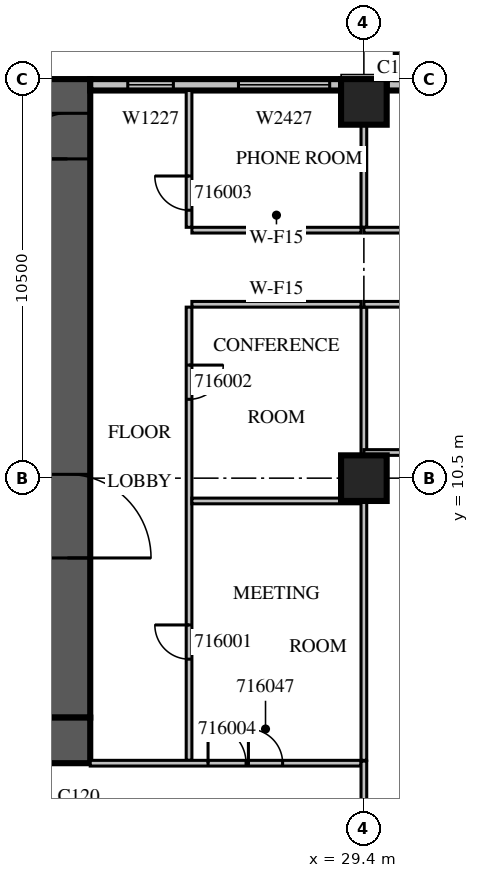
"""IFC4 building model, lengths in metres.
Left out: names, types, materials, properties, quantities, classifications, styles, units other than length and angle.
Written with IfcOpenShell. Run it as: python <this file> out.ifc"""

import sys

from ifc_helpers import new_model, si_unit, direction, frame, frame_2d, origin, origin_2d, place, context, subcontext, project, spatial, rectangle, extrude, source, transform, mapped, element, fill, save


model = new_model("IFC4")
c1 = context("Model", 3, precision=1e-05, world=origin(), true_north=direction((0.0, 1.0)))
c2 = subcontext(c1, "Body", "Model", "MODEL_VIEW")
j1 = project(units=[si_unit("LENGTHUNIT", "METRE"), si_unit("PLANEANGLEUNIT", "RADIAN")], contexts=[c1])
p1 = place(None, origin())
s1 = spatial("IfcSite", under=j1, at=p1, CompositionType="ELEMENT")
p2 = place(p1, origin())
s2 = spatial("IfcBuilding", under=s1, at=p2, CompositionType="ELEMENT")
p3 = place(p2, frame((0.0, 0.0, 78.3)))
s3 = spatial("IfcBuildingStorey", under=s2, at=p3, CompositionType="ELEMENT", Elevation=78.3)
m1 = source(origin(), c2, "Body", "SweptSolid", [
    extrude(rectangle(XDim=1.2, YDim=1.2, at=origin_2d()), origin(), (0.0, 0.0, 1.0), 4.2),
])
for number, where, z_axis, x_axis in (
    (1, (29.4, 10.5, 0.0), (0.0, 0.0, 1.0), (1.0, 0.0, 0.0)),
    (2, (29.4, 20.4, 0.0), (0.0, 0.0, 1.0), (1.0, 0.0, 0.0)),
):
    element("IfcColumn", number, at=place(p3, frame(where, z_axis=z_axis, x_axis=x_axis)), inside=s3, PredefinedType="COLUMN", context=c2, shape_type="MappedRepresentation", body=[
        mapped(m1, transform((0.0, 0.0, 0.0), scale=1.0)),
    ])
m2 = source(origin(), c2, "Body", "SweptSolid", [
    extrude(rectangle(XDim=16.8, YDim=1.2, at=frame_2d((8.4, 0.0))), origin(), (0.0, 0.0, 1.0), 4.2),
])
p4 = place(p3, frame((21.6, 4.2, 0.0), z_axis=(0.0, 0.0, 1.0), x_axis=(0.0, 1.0, 0.0)))
e3 = element("IfcWall", 3, at=p4, inside=s3, PredefinedType="SHEAR", context=c2, shape_type="MappedRepresentation", body=[
    mapped(m2, transform((0.0, 0.0, 0.0), scale=1.0)),
])
m3 = source(origin(), c2, "Body", "SweptSolid", [
    extrude(rectangle(XDim=2.2, YDim=2.1, at=frame_2d((1.1, 1.05))), frame((0.0, 0.61, 0.0), z_axis=(0.0, -1.0, 0.0), x_axis=(1.0, 0.0, 0.0)), (0.0, 0.0, 1.0), 1.22),
])
p5 = place(p4, frame((4.2, 0.0, 0.0)))
e4 = element("IfcOpeningElement", 4, at=p5, cuts=e3, PredefinedType="OPENING", context=c2, shape_type="MappedRepresentation", body=[
    mapped(m3, transform((0.0, 0.0, 0.0), scale=1.0)),
])
m4 = source(origin(), c2, "Body", "SweptSolid", [
    extrude(rectangle(XDim=1.2, YDim=2.1, at=frame_2d((0.6, 1.05))), frame((0.0, 0.61, 0.0), z_axis=(0.0, -1.0, 0.0), x_axis=(1.0, 0.0, 0.0)), (0.0, 0.0, 1.0), 1.22),
])
p6 = place(p4, frame((14.7, 0.0, 0.0)))
e5 = element("IfcOpeningElement", 5, at=p6, cuts=e3, PredefinedType="OPENING", context=c2, shape_type="MappedRepresentation", body=[
    mapped(m4, transform((0.0, 0.0, 0.0), scale=1.0)),
])
m5 = source(origin(), c2, "Body", "SweptSolid", [
    extrude(rectangle(XDim=18.0, YDim=1.2, at=frame_2d((9.0, 0.0))), origin(), (0.0, 0.0, 1.0), 4.2),
])
p7 = place(p3, frame((4.2, 3.6, 0.0), z_axis=(0.0, 0.0, 1.0), x_axis=(1.0, 0.0, 0.0)))
e6 = element("IfcWall", 6, at=p7, inside=s3, PredefinedType="SHEAR", context=c2, shape_type="MappedRepresentation", body=[
    mapped(m5, transform((0.0, 0.0, 0.0), scale=1.0)),
])
m6 = source(origin(), c2, "Body", "SweptSolid", [
    extrude(rectangle(XDim=7.2, YDim=0.3, at=frame_2d((3.6, 0.0))), origin(), (0.0, 0.0, 1.0), 3.8),
])
p8 = place(p3, frame((37.2, 20.85, 0.0), z_axis=(0.0, 0.0, 1.0), x_axis=(-1.0, 0.0, 0.0)))
e7 = element("IfcWall", 7, at=p8, inside=s3, PredefinedType="STANDARD", context=c2, shape_type="MappedRepresentation", body=[
    mapped(m6, transform((0.0, 0.0, 0.0), scale=1.0)),
])
m7 = source(origin(), c2, "Body", "SweptSolid", [
    extrude(rectangle(XDim=1.0, YDim=2.1, at=frame_2d((0.5, 1.05))), frame((0.0, 0.16, 0.0), z_axis=(0.0, -1.0, 0.0), x_axis=(1.0, 0.0, 0.0)), (0.0, 0.0, 1.0), 0.32),
])
p9 = place(p8, frame((5.06, 0.0, 0.0)))
e8 = element("IfcOpeningElement", 8, at=p9, cuts=e7, PredefinedType="OPENING", context=c2, shape_type="MappedRepresentation", body=[
    mapped(m7, transform((0.0, 0.0, 0.0), scale=1.0)),
])
m8 = source(origin(), c2, "Body", "SweptSolid", [
    extrude(rectangle(XDim=6.6, YDim=0.3, at=frame_2d((3.3, 0.0))), origin(), (0.0, 0.0, 1.0), 3.8),
])
p10 = place(p3, frame((28.8, 20.85, 0.0), z_axis=(0.0, 0.0, 1.0), x_axis=(-1.0, 0.0, 0.0)))
e9 = element("IfcWall", 9, at=p10, inside=s3, PredefinedType="STANDARD", context=c2, shape_type="MappedRepresentation", body=[
    mapped(m8, transform((0.0, 0.0, 0.0), scale=1.0)),
])
m9 = source(origin(), c2, "Body", "SweptSolid", [
    extrude(rectangle(XDim=2.4, YDim=2.7, at=frame_2d((1.2, 1.35))), frame((0.0, 0.16, 0.0), z_axis=(0.0, -1.0, 0.0), x_axis=(1.0, 0.0, 0.0)), (0.0, 0.0, 1.0), 0.32),
])
p11 = place(p10, frame((0.3, 0.0, 0.6)))
e10 = element("IfcOpeningElement", 10, at=p11, cuts=e9, PredefinedType="OPENING", context=c2, shape_type="MappedRepresentation", body=[
    mapped(m9, transform((0.0, 0.0, 0.0), scale=1.0)),
])
m10 = source(origin(), c2, "Body", "SweptSolid", [
    extrude(rectangle(XDim=1.2, YDim=2.7, at=frame_2d((0.6, 1.35))), frame((0.0, 0.16, 0.0), z_axis=(0.0, -1.0, 0.0), x_axis=(1.0, 0.0, 0.0)), (0.0, 0.0, 1.0), 0.32),
])
p12 = place(p10, frame((4.412, 0.0, 0.6)))
e11 = element("IfcOpeningElement", 11, at=p12, cuts=e9, PredefinedType="OPENING", context=c2, shape_type="MappedRepresentation", body=[
    mapped(m10, transform((0.0, 0.0, 0.0), scale=1.0)),
])
m11 = source(origin(), c2, "Body", "SweptSolid", [
    extrude(rectangle(XDim=3.9, YDim=0.2, at=frame_2d((1.95, 0.0))), origin(), (0.0, 0.0, 1.0), 3.79),
])
p13 = place(p3, frame((30.34, 21.0, 0.0), z_axis=(0.0, 0.0, 1.0), x_axis=(0.0, 1.0, 0.0)))
e12 = element("IfcWall", 12, at=p13, inside=s3, PredefinedType="SOLIDWALL", context=c2, shape_type="MappedRepresentation", body=[
    mapped(m11, transform((0.0, 0.0, 0.0), scale=1.0)),
])
m12 = source(origin(), c2, "Body", "SweptSolid", [
    extrude(rectangle(XDim=2.4, YDim=2.7, at=frame_2d((1.2, 1.35))), frame((0.0, 0.11, 0.0), z_axis=(0.0, -1.0, 0.0), x_axis=(1.0, 0.0, 0.0)), (0.0, 0.0, 1.0), 0.22),
])
p14 = place(p13, frame((0.75, 0.0, 0.6)))
e13 = element("IfcOpeningElement", 13, at=p14, cuts=e12, PredefinedType="OPENING", context=c2, shape_type="MappedRepresentation", body=[
    mapped(m12, transform((0.0, 0.0, 0.0), scale=1.0)),
])
m13 = source(origin(), c2, "Body", "SweptSolid", [
    extrude(rectangle(XDim=11.925, YDim=0.15, at=frame_2d((5.963, 0.0))), origin(), (0.0, 0.0, 1.0), 3.8),
])
p15 = place(p3, frame((24.8, 15.0, 0.0), z_axis=(0.0, 0.0, 1.0), x_axis=(0.0, -1.0, 0.0)))
e14 = element("IfcWall", 14, at=p15, inside=s3, PredefinedType="PARTITIONING", context=c2, shape_type="MappedRepresentation", body=[
    mapped(m13, transform((0.0, 0.0, 0.0), scale=1.0)),
])
m14 = source(origin(), c2, "Body", "SweptSolid", [
    extrude(rectangle(XDim=0.9, YDim=2.1, at=frame_2d((0.45, 1.05))), frame((0.0, 0.085, 0.0), z_axis=(0.0, -1.0, 0.0), x_axis=(1.0, 0.0, 0.0)), (0.0, 0.0, 1.0), 0.17),
])
p16 = place(p15, frame((8.363, 0.0, 0.0)))
e15 = element("IfcOpeningElement", 15, at=p16, cuts=e14, PredefinedType="OPENING", context=c2, shape_type="MappedRepresentation", body=[
    mapped(m14, transform((0.0, 0.0, 0.0), scale=1.0)),
])
p17 = place(p15, frame((1.525, 0.0, 0.0)))
e16 = element("IfcOpeningElement", 16, at=p17, cuts=e14, PredefinedType="OPENING", context=c2, shape_type="MappedRepresentation", body=[
    mapped(m14, transform((0.0, 0.0, 0.0), scale=1.0)),
])
m15 = source(origin(), c2, "Body", "SweptSolid", [
    extrude(rectangle(XDim=3.6, YDim=0.15, at=frame_2d((1.8, 0.0))), origin(), (0.0, 0.0, 1.0), 3.8),
])
p18 = place(p3, frame((24.8, 20.7, 0.0), z_axis=(0.0, 0.0, 1.0), x_axis=(0.0, -1.0, 0.0)))
e17 = element("IfcWall", 17, at=p18, inside=s3, PredefinedType="PARTITIONING", context=c2, shape_type="MappedRepresentation", body=[
    mapped(m15, transform((0.0, 0.0, 0.0), scale=1.0)),
])
p19 = place(p18, frame((2.25, 0.0, 0.0)))
e18 = element("IfcOpeningElement", 18, at=p19, cuts=e17, PredefinedType="OPENING", context=c2, shape_type="MappedRepresentation", body=[
    mapped(m14, transform((0.0, 0.0, 0.0), scale=1.0)),
])
m16 = source(origin(), c2, "Body", "SweptSolid", [
    extrude(rectangle(XDim=4.45, YDim=0.15, at=frame_2d((2.225, 0.0))), origin(), (0.0, 0.0, 1.0), 3.8),
])
for number, where, z_axis, x_axis in (
    (19, (29.325, 9.9, 0.0), (0.0, 0.0, 1.0), (-1.0, 0.0, 0.0)),
    (20, (29.325, 15.075, 0.0), (0.0, 0.0, 1.0), (-1.0, 0.0, 0.0)),
    (21, (24.875, 17.025, 0.0), (0.0, 0.0, 1.0), (1.0, 0.0, 0.0)),
):
    element("IfcWall", number, at=place(p3, frame(where, z_axis=z_axis, x_axis=x_axis)), inside=s3, PredefinedType="PARTITIONING", context=c2, shape_type="MappedRepresentation", body=[
        mapped(m16, transform((0.0, 0.0, 0.0), scale=1.0)),
    ])
m17 = source(origin(), c2, "Body", "SweptSolid", [
    extrude(rectangle(XDim=6.826, YDim=0.15, at=frame_2d((3.413, 0.0))), origin(), (0.0, 0.0, 1.0), 3.8),
])
p20 = place(p3, frame((29.4, 3.075, 0.0), z_axis=(0.0, 0.0, 1.0), x_axis=(0.0, 1.0, 0.0)))
e22 = element("IfcWall", 22, at=p20, inside=s3, PredefinedType="PARTITIONING", context=c2, shape_type="MappedRepresentation", body=[
    mapped(m17, transform((0.0, 0.0, 0.0), scale=1.0)),
])
m18 = source(origin(), c2, "Body", "SweptSolid", [
    extrude(rectangle(XDim=3.901, YDim=0.15, at=frame_2d((1.95, 0.0))), origin(), (0.0, 0.0, 1.0), 3.8),
])
p21 = place(p3, frame((29.4, 11.099, 0.0), z_axis=(0.0, 0.0, 1.0), x_axis=(0.0, 1.0, 0.0)))
e23 = element("IfcWall", 23, at=p21, inside=s3, PredefinedType="PARTITIONING", context=c2, shape_type="MappedRepresentation", body=[
    mapped(m18, transform((0.0, 0.0, 0.0), scale=1.0)),
])
m19 = source(origin(), c2, "Body", "SweptSolid", [
    extrude(rectangle(XDim=2.701, YDim=0.15, at=frame_2d((1.351, 0.0))), origin(), (0.0, 0.0, 1.0), 3.8),
])
p22 = place(p3, frame((29.4, 17.1, 0.0), z_axis=(0.0, 0.0, 1.0), x_axis=(0.0, 1.0, 0.0)))
e24 = element("IfcWall", 24, at=p22, inside=s3, PredefinedType="PARTITIONING", context=c2, shape_type="MappedRepresentation", body=[
    mapped(m19, transform((0.0, 0.0, 0.0), scale=1.0)),
])
m20 = source(origin(), c2, "Body", "SweptSolid", [
    extrude(rectangle(XDim=7.125, YDim=0.15, at=frame_2d((3.562, 0.0))), origin(), (0.0, 0.0, 1.0), 3.8),
])
p23 = place(p3, frame((22.2, 3.0, 0.0), z_axis=(0.0, 0.0, 1.0), x_axis=(1.0, 0.0, 0.0)))
e25 = element("IfcWall", 25, at=p23, inside=s3, PredefinedType="PARTITIONING", context=c2, shape_type="MappedRepresentation", body=[
    mapped(m20, transform((0.0, 0.0, 0.0), scale=1.0)),
])
m21 = source(origin(), c2, "Body", "SweptSolid", [
    extrude(rectangle(XDim=1.0, YDim=2.1, at=frame_2d((0.5, 1.05))), frame((0.0, 0.085, 0.0), z_axis=(0.0, -1.0, 0.0), x_axis=(1.0, 0.0, 0.0)), (0.0, 0.0, 1.0), 0.17),
])
p24 = place(p23, frame((3.1, 0.0, 0.0)))
e26 = element("IfcOpeningElement", 26, at=p24, cuts=e25, PredefinedType="OPENING", context=c2, shape_type="MappedRepresentation", body=[
    mapped(m21, transform((0.0, 0.0, 0.0), scale=1.0)),
])
p25 = place(p23, frame((4.162, 0.0, 0.0)))
e27 = element("IfcOpeningElement", 27, at=p25, cuts=e25, PredefinedType="OPENING", context=c2, shape_type="MappedRepresentation", body=[
    mapped(m14, transform((0.0, 0.0, 0.0), scale=1.0)),
])
m22 = source(origin(), c2, "Body", "SweptSolid", [
    extrude(rectangle(XDim=1.856, YDim=0.15, at=frame_2d((0.928, 0.0))), origin(), (0.0, 0.0, 1.0), 3.8),
])
p26 = place(p3, frame((29.4, 1.199, 0.0), z_axis=(0.0, 0.0, 1.0), x_axis=(0.0, 1.0, 0.0)))
e28 = element("IfcWall", 28, at=p26, inside=s3, PredefinedType="PARTITIONING", context=c2, shape_type="MappedRepresentation", body=[
    mapped(m22, transform((0.0, 0.0, 0.0), scale=1.0)),
])
m23 = source(origin(), c2, "Body", "SweptSolid", [
    extrude(rectangle(XDim=8.4, YDim=0.15, at=frame_2d((4.2, 0.0))), origin(), (0.0, 0.0, 1.0), 3.8),
])
p27 = place(p3, frame((37.8, 11.175, 0.0), z_axis=(0.0, 0.0, 1.0), x_axis=(-1.0, 0.0, 0.0)))
e29 = element("IfcWall", 29, at=p27, inside=s3, PredefinedType="PARTITIONING", context=c2, shape_type="MappedRepresentation", body=[
    mapped(m23, transform((0.0, 0.0, 0.0), scale=1.0)),
])
m24 = source(origin(), c2, "Body", "SweptSolid", [
    extrude(rectangle(XDim=1.1, YDim=2.1, at=frame_2d((0.55, 1.05))), frame((0.0, 0.085, 0.0), z_axis=(0.0, -1.0, 0.0), x_axis=(1.0, 0.0, 0.0)), (0.0, 0.0, 1.0), 0.17),
])
p28 = place(p27, frame((5.833, 0.0, 0.0)))
e30 = element("IfcOpeningElement", 30, at=p28, cuts=e29, PredefinedType="OPENING", context=c2, shape_type="MappedRepresentation", body=[
    mapped(m24, transform((0.0, 0.0, 0.0), scale=1.0)),
])
p29 = place(p3, frame((37.8, 15.075, 0.0), z_axis=(0.0, 0.0, 1.0), x_axis=(-1.0, 0.0, 0.0)))
e31 = element("IfcWall", 31, at=p29, inside=s3, PredefinedType="PARTITIONING", context=c2, shape_type="MappedRepresentation", body=[
    mapped(m23, transform((0.0, 0.0, 0.0), scale=1.0)),
])
p30 = place(p29, frame((6.146, 0.0, 0.0)))
e32 = element("IfcOpeningElement", 32, at=p30, cuts=e31, PredefinedType="OPENING", context=c2, shape_type="MappedRepresentation", body=[
    mapped(m24, transform((0.0, 0.0, 0.0), scale=1.0)),
])
p31 = place(p29, frame((3.276, 0.0, 0.0)))
e33 = element("IfcOpeningElement", 33, at=p31, cuts=e31, PredefinedType="OPENING", context=c2, shape_type="MappedRepresentation", body=[
    mapped(m14, transform((0.0, 0.0, 0.0), scale=1.0)),
])
p32 = place(p29, frame((0.781, 0.0, 0.0)))
e34 = element("IfcOpeningElement", 34, at=p32, cuts=e31, PredefinedType="OPENING", context=c2, shape_type="MappedRepresentation", body=[
    mapped(m14, transform((0.0, 0.0, 0.0), scale=1.0)),
])
m25 = source(origin(), c2, "Body", "SweptSolid", [
    extrude(rectangle(XDim=37.5, YDim=0.15, at=frame_2d((18.75, 0.0))), origin(), (0.0, 0.0, 1.0), 3.8),
])
p33 = place(p3, frame((29.4, 17.025, 0.0), z_axis=(0.0, 0.0, 1.0), x_axis=(1.0, 0.0, 0.0)))
e35 = element("IfcWall", 35, at=p33, inside=s3, PredefinedType="PARTITIONING", context=c2, shape_type="MappedRepresentation", body=[
    mapped(m25, transform((0.0, 0.0, 0.0), scale=1.0)),
])
p34 = place(p33, frame((1.357, 0.0, 0.0)))
e36 = element("IfcOpeningElement", 36, at=p34, cuts=e35, PredefinedType="OPENING", context=c2, shape_type="MappedRepresentation", body=[
    mapped(m21, transform((0.0, 0.0, 0.0), scale=1.0)),
])
p35 = place(p33, frame((4.669, 0.0, 0.0)))
e37 = element("IfcOpeningElement", 37, at=p35, cuts=e35, PredefinedType="OPENING", context=c2, shape_type="MappedRepresentation", body=[
    mapped(m21, transform((0.0, 0.0, 0.0), scale=1.0)),
])
p36 = place(p33, frame((7.012, 0.0, 0.0)))
e38 = element("IfcOpeningElement", 38, at=p36, cuts=e35, PredefinedType="OPENING", context=c2, shape_type="MappedRepresentation", body=[
    mapped(m21, transform((0.0, 0.0, 0.0), scale=1.0)),
])
p37 = place(p33, frame((10.0, 0.0, 0.0)))
e39 = element("IfcOpeningElement", 39, at=p37, cuts=e35, PredefinedType="OPENING", context=c2, shape_type="MappedRepresentation", body=[
    mapped(m21, transform((0.0, 0.0, 0.0), scale=1.0)),
])
p38 = place(p33, frame((14.822, 0.0, 0.0)))
e40 = element("IfcOpeningElement", 40, at=p38, cuts=e35, PredefinedType="OPENING", context=c2, shape_type="MappedRepresentation", body=[
    mapped(m14, transform((0.0, 0.0, 0.0), scale=1.0)),
])
p39 = place(p33, frame((20.13, 0.0, 0.0)))
e41 = element("IfcOpeningElement", 41, at=p39, cuts=e35, PredefinedType="OPENING", context=c2, shape_type="MappedRepresentation", body=[
    mapped(m14, transform((0.0, 0.0, 0.0), scale=1.0)),
])
p40 = place(p33, frame((25.438, 0.0, 0.0)))
e42 = element("IfcOpeningElement", 42, at=p40, cuts=e35, PredefinedType="OPENING", context=c2, shape_type="MappedRepresentation", body=[
    mapped(m14, transform((0.0, 0.0, 0.0), scale=1.0)),
])
p41 = place(p33, frame((30.364, 0.0, 0.0)))
e43 = element("IfcOpeningElement", 43, at=p41, cuts=e35, PredefinedType="OPENING", context=c2, shape_type="MappedRepresentation", body=[
    mapped(m14, transform((0.0, 0.0, 0.0), scale=1.0)),
])
p42 = place(p33, frame((34.871, 0.0, 0.0)))
e44 = element("IfcOpeningElement", 44, at=p42, cuts=e35, PredefinedType="OPENING", context=c2, shape_type="MappedRepresentation", body=[
    mapped(m14, transform((0.0, 0.0, 0.0), scale=1.0)),
])
m26 = source(origin(), c2, "Body", "SweptSolid", [
    extrude(rectangle(XDim=2.4, YDim=2.7, at=frame_2d((1.2, 1.35))), frame((0.0, 0.03, 0.0), z_axis=(0.0, -1.0, 0.0), x_axis=(1.0, 0.0, 0.0)), (0.0, 0.0, 1.0), 0.06),
])
p43 = place(p11, origin())
e45 = element("IfcWindow", 45, at=p43, inside=s3, PartitioningType="SINGLE_PANEL", PredefinedType="WINDOW", context=c2, shape_type="MappedRepresentation", body=[
    mapped(m26, transform((0.0, 0.0, 0.0), scale=1.0)),
])
fill(e10, e45)
m27 = source(origin(), c2, "Body", "SweptSolid", [
    extrude(rectangle(XDim=1.2, YDim=2.7, at=frame_2d((0.6, 1.35))), frame((0.0, 0.03, 0.0), z_axis=(0.0, -1.0, 0.0), x_axis=(1.0, 0.0, 0.0)), (0.0, 0.0, 1.0), 0.06),
])
p44 = place(p12, origin())
e46 = element("IfcWindow", 46, at=p44, inside=s3, PartitioningType="SINGLE_PANEL", PredefinedType="WINDOW", context=c2, shape_type="MappedRepresentation", body=[
    mapped(m27, transform((0.0, 0.0, 0.0), scale=1.0)),
])
fill(e11, e46)
m28 = source(origin(), c2, "Body", "SweptSolid", [
    extrude(rectangle(XDim=2.2, YDim=2.1, at=frame_2d((1.1, 1.05))), frame((0.0, 0.025, 0.0), z_axis=(0.0, -1.0, 0.0), x_axis=(1.0, 0.0, 0.0)), (0.0, 0.0, 1.0), 0.05),
])
p45 = place(p5, origin())
e47 = element("IfcDoor", 47, at=p45, inside=s3, OperationType="DOUBLE_DOOR_SINGLE_SWING", PredefinedType="DOOR", context=c2, shape_type="MappedRepresentation", body=[
    mapped(m28, transform((0.0, 0.0, 0.0), scale=1.0)),
])
fill(e4, e47)
m29 = source(origin(), c2, "Body", "SweptSolid", [
    extrude(rectangle(XDim=1.2, YDim=2.1, at=frame_2d((0.6, 1.05))), frame((0.0, 0.025, 0.0), z_axis=(0.0, -1.0, 0.0), x_axis=(1.0, 0.0, 0.0)), (0.0, 0.0, 1.0), 0.05),
])
p46 = place(p6, origin())
e48 = element("IfcDoor", 48, at=p46, inside=s3, OperationType="SINGLE_SWING_LEFT", PredefinedType="DOOR", context=c2, shape_type="MappedRepresentation", body=[
    mapped(m29, transform((0.0, 0.0, 0.0), scale=1.0)),
])
fill(e5, e48)
m30 = source(origin(), c2, "Body", "SweptSolid", [
    extrude(rectangle(XDim=0.9, YDim=2.1, at=frame_2d((0.45, 1.05))), frame((0.0, 0.025, 0.0), z_axis=(0.0, -1.0, 0.0), x_axis=(1.0, 0.0, 0.0)), (0.0, 0.0, 1.0), 0.05),
])
p47 = place(p16, origin())
e49 = element("IfcDoor", 49, at=p47, inside=s3, OperationType="SINGLE_SWING_RIGHT", PredefinedType="DOOR", context=c2, shape_type="MappedRepresentation", body=[
    mapped(m30, transform((0.0, 0.0, 0.0), scale=1.0)),
])
fill(e15, e49)
p48 = place(p17, origin())
e50 = element("IfcDoor", 50, at=p48, inside=s3, OperationType="SINGLE_SWING_LEFT", PredefinedType="DOOR", context=c2, shape_type="MappedRepresentation", body=[
    mapped(m30, transform((0.0, 0.0, 0.0), scale=1.0)),
])
fill(e16, e50)
p49 = place(p19, origin())
e51 = element("IfcDoor", 51, at=p49, inside=s3, OperationType="SINGLE_SWING_RIGHT", PredefinedType="DOOR", context=c2, shape_type="MappedRepresentation", body=[
    mapped(m30, transform((0.0, 0.0, 0.0), scale=1.0)),
])
fill(e18, e51)
m31 = source(origin(), c2, "Body", "SweptSolid", [
    extrude(rectangle(XDim=1.0, YDim=2.1, at=frame_2d((0.5, 1.05))), frame((0.0, 0.025, 0.0), z_axis=(0.0, -1.0, 0.0), x_axis=(1.0, 0.0, 0.0)), (0.0, 0.0, 1.0), 0.05),
])
p50 = place(p24, origin())
e52 = element("IfcDoor", 52, at=p50, inside=s3, OperationType="SINGLE_SWING_LEFT", PredefinedType="DOOR", context=c2, shape_type="MappedRepresentation", body=[
    mapped(m31, transform((0.0, 0.0, 0.0), scale=1.0)),
])
fill(e26, e52)
p51 = place(p25, origin())
e53 = element("IfcDoor", 53, at=p51, inside=s3, OperationType="SINGLE_SWING_LEFT", PredefinedType="DOOR", context=c2, shape_type="MappedRepresentation", body=[
    mapped(m30, transform((0.0, 0.0, 0.0), scale=1.0)),
])
fill(e27, e53)
save(model, sys.argv[1])
